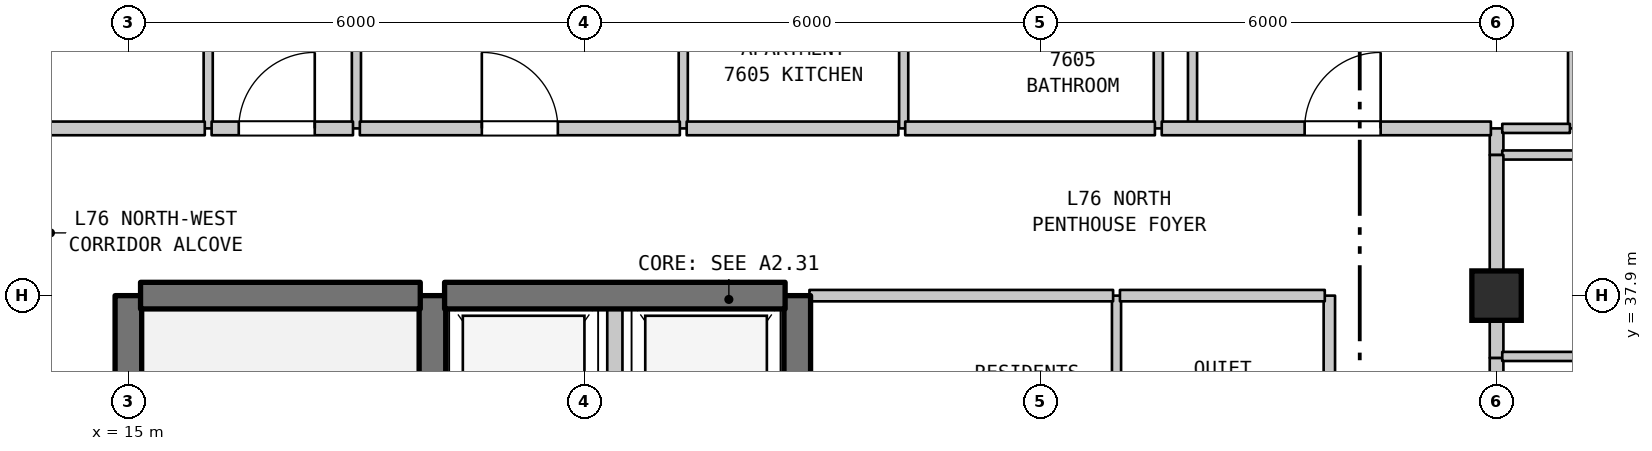
"""IFC4 building model, lengths in metres.
Left out: names, types, materials, properties, quantities, classifications, styles, units other than length and angle.
Written with IfcOpenShell. Run it as: python <this file> out.ifc"""

import sys

from ifc_helpers import new_model, si_unit, direction, frame, frame_2d, origin, origin_2d, place, context, subcontext, project, spatial, rectangle, extrude, element, fill, save


model = new_model("IFC4")
c1 = context("Model", 3, precision=1e-05, world=origin(), true_north=direction((0.0, 1.0)))
c2 = subcontext(c1, "Body", "Model", "MODEL_VIEW")
j1 = project(units=[si_unit("LENGTHUNIT", "METRE"), si_unit("PLANEANGLEUNIT", "RADIAN")], contexts=[c1])
p1 = place(None, origin())
s1 = spatial("IfcSite", under=j1, at=p1, CompositionType="ELEMENT")
p2 = place(p1, origin())
s2 = spatial("IfcBuilding", under=s1, at=p2, CompositionType="ELEMENT")
p3 = place(p2, frame((0.0, 0.0, 303.6)))
s3 = spatial("IfcBuildingStorey", under=s2, at=p3, CompositionType="ELEMENT", Elevation=303.6)
p4 = place(p3, frame((33.0, 37.9, 0.0), z_axis=(0.0, 0.0, 1.0), x_axis=(1.0, 0.0, 0.0)))
e1 = element("IfcColumn", 1, at=p4, inside=s3, PredefinedType="COLUMN", context=c2, shape_type="SweptSolid", body=[
    extrude(rectangle(XDim=0.65, YDim=0.65, at=origin_2d()), origin(), (0.0, 0.0, 1.0), 3.7),
])
p5 = place(p3, frame((15.0, 31.1, 0.0), z_axis=(0.0, 0.0, 1.0), x_axis=(0.0, 1.0, 0.0)))
e2 = element("IfcWall", 2, at=p5, inside=s3, PredefinedType="SHEAR", context=c2, shape_type="SweptSolid", body=[
    extrude(rectangle(XDim=6.8, YDim=0.35, at=frame_2d((3.4, 0.0))), origin(), (0.0, 0.0, 1.0), 3.39),
])
p6 = place(p3, frame((16.05, 40.1, 0.0), z_axis=(0.0, 0.0, 1.0), x_axis=(0.0, 1.0, 0.0)))
e3 = element("IfcWall", 3, at=p6, inside=s3, PredefinedType="PARTITIONING", context=c2, shape_type="SweptSolid", body=[
    extrude(rectangle(XDim=3.2, YDim=0.12, at=frame_2d((1.6, 0.0))), origin(), (0.0, 0.0, 1.0), 3.39),
])
p7 = place(p3, frame((18.0, 40.1, 0.0), z_axis=(0.0, 0.0, 1.0), x_axis=(0.0, 1.0, 0.0)))
e4 = element("IfcWall", 4, at=p7, inside=s3, PredefinedType="PARTITIONING", context=c2, shape_type="SweptSolid", body=[
    extrude(rectangle(XDim=13.79, YDim=0.12, at=frame_2d((6.895, 0.0))), origin(), (0.0, 0.0, 1.0), 3.39),
])
p8 = place(p3, frame((19.0, 35.0, 0.0), z_axis=(0.0, 0.0, 1.0), x_axis=(0.0, 1.0, 0.0)))
e5 = element("IfcWall", 5, at=p8, inside=s3, PredefinedType="SHEAR", context=c2, shape_type="SweptSolid", body=[
    extrude(rectangle(XDim=2.9, YDim=0.35, at=frame_2d((1.45, 0.0))), origin(), (0.0, 0.0, 1.0), 3.39),
])
p9 = place(p3, frame((21.4, 35.0, 0.0), z_axis=(0.0, 0.0, 1.0), x_axis=(0.0, 1.0, 0.0)))
e6 = element("IfcWall", 6, at=p9, inside=s3, PredefinedType="STANDARD", context=c2, shape_type="SweptSolid", body=[
    extrude(rectangle(XDim=2.9, YDim=0.2, at=frame_2d((1.45, 0.0))), origin(), (0.0, 0.0, 1.0), 3.39),
])
p10 = place(p3, frame((22.3, 40.1, 0.0), z_axis=(0.0, 0.0, 1.0), x_axis=(0.0, 1.0, 0.0)))
e7 = element("IfcWall", 7, at=p10, inside=s3, PredefinedType="PARTITIONING", context=c2, shape_type="SweptSolid", body=[
    extrude(rectangle(XDim=2.3, YDim=0.12, at=frame_2d((1.15, 0.0))), origin(), (0.0, 0.0, 1.0), 3.39),
])
p11 = place(p3, frame((23.8, 35.0, 0.0), z_axis=(0.0, 0.0, 1.0), x_axis=(0.0, 1.0, 0.0)))
e8 = element("IfcWall", 8, at=p11, inside=s3, PredefinedType="SHEAR", context=c2, shape_type="SweptSolid", body=[
    extrude(rectangle(XDim=2.9, YDim=0.35, at=frame_2d((1.45, 0.0))), origin(), (0.0, 0.0, 1.0), 3.39),
])
p12 = place(p3, frame((25.2, 40.1, 0.0), z_axis=(0.0, 0.0, 1.0), x_axis=(0.0, 1.0, 0.0)))
e9 = element("IfcWall", 9, at=p12, inside=s3, PredefinedType="PARTITIONING", context=c2, shape_type="SweptSolid", body=[
    extrude(rectangle(XDim=2.3, YDim=0.12, at=frame_2d((1.15, 0.0))), origin(), (0.0, 0.0, 1.0), 3.39),
])
p13 = place(p3, frame((28.0, 35.0, 0.0), z_axis=(0.0, 0.0, 1.0), x_axis=(0.0, 1.0, 0.0)))
e10 = element("IfcWall", 10, at=p13, inside=s3, PredefinedType="PARTITIONING", context=c2, shape_type="SweptSolid", body=[
    extrude(rectangle(XDim=2.9, YDim=0.12, at=frame_2d((1.45, 0.0))), origin(), (0.0, 0.0, 1.0), 3.39),
])
p14 = place(p3, frame((28.55, 40.1, 0.0), z_axis=(0.0, 0.0, 1.0), x_axis=(0.0, 1.0, 0.0)))
e11 = element("IfcWall", 11, at=p14, inside=s3, PredefinedType="PARTITIONING", context=c2, shape_type="SweptSolid", body=[
    extrude(rectangle(XDim=2.3, YDim=0.12, at=frame_2d((1.15, 0.0))), origin(), (0.0, 0.0, 1.0), 3.39),
])
p15 = place(p3, frame((29.0, 40.1, 0.0), z_axis=(0.0, 0.0, 1.0), x_axis=(0.0, 1.0, 0.0)))
e12 = element("IfcWall", 12, at=p15, inside=s3, PredefinedType="PARTITIONING", context=c2, shape_type="SweptSolid", body=[
    extrude(rectangle(XDim=2.05, YDim=0.12, at=frame_2d((1.025, 0.0))), origin(), (0.0, 0.0, 1.0), 3.39),
])
p16 = place(p3, frame((30.8, 35.0, 0.0), z_axis=(0.0, 0.0, 1.0), x_axis=(0.0, 1.0, 0.0)))
e13 = element("IfcWall", 13, at=p16, inside=s3, PredefinedType="STANDARD", context=c2, shape_type="SweptSolid", body=[
    extrude(rectangle(XDim=2.9, YDim=0.15, at=frame_2d((1.45, 0.0))), origin(), (0.0, 0.0, 1.0), 3.39),
])
p17 = place(p3, frame((33.0, 34.883, 0.0), z_axis=(0.0, 0.0, 1.0), x_axis=(0.0, 1.0, 0.0)))
e14 = element("IfcWall", 14, at=p17, inside=s3, PredefinedType="STANDARD", context=c2, shape_type="SweptSolid", body=[
    extrude(rectangle(XDim=2.198, YDim=0.18, at=frame_2d((1.099, 0.0))), origin(), (0.0, 0.0, 1.0), 2.89),
])
p18 = place(p3, frame((33.0, 37.081, 0.0), z_axis=(0.0, 0.0, 1.0), x_axis=(0.0, 1.0, 0.0)))
e15 = element("IfcWall", 15, at=p18, inside=s3, PredefinedType="STANDARD", context=c2, shape_type="SweptSolid", body=[
    extrude(rectangle(XDim=0.819, YDim=0.18, at=frame_2d((0.409, 0.0))), origin(), (0.0, 0.0, 1.0), 2.89),
])
p19 = place(p3, frame((33.0, 39.75, 0.0), z_axis=(0.0, 0.0, 1.0), x_axis=(0.0, 1.0, 0.0)))
e16 = element("IfcWall", 16, at=p19, inside=s3, PredefinedType="STANDARD", context=c2, shape_type="SweptSolid", body=[
    extrude(rectangle(XDim=0.35, YDim=0.18, at=frame_2d((0.175, 0.0))), origin(), (0.0, 0.0, 1.0), 3.39),
])
p20 = place(p3, frame((34.0, 40.1, 0.0), z_axis=(0.0, 0.0, 1.0), x_axis=(0.0, 1.0, 0.0)))
e17 = element("IfcWall", 17, at=p20, inside=s3, PredefinedType="PARTITIONING", context=c2, shape_type="SweptSolid", body=[
    extrude(rectangle(XDim=2.3, YDim=0.12, at=frame_2d((1.15, 0.0))), origin(), (0.0, 0.0, 1.0), 3.39),
])
p21 = place(p3, frame((33.075, 37.1, 0.0), z_axis=(0.0, 0.0, 1.0), x_axis=(1.0, 0.0, 0.0)))
e18 = element("IfcWall", 18, at=p21, inside=s3, PredefinedType="PARTITIONING", context=c2, shape_type="SweptSolid", body=[
    extrude(rectangle(XDim=4.46, YDim=0.12, at=frame_2d((2.23, 0.0))), origin(), (0.0, 0.0, 1.0), 3.39),
])
p22 = place(p3, frame((15.16, 37.9, 0.0), z_axis=(0.0, 0.0, 1.0), x_axis=(1.0, 0.0, 0.0)))
e19 = element("IfcWall", 19, at=p22, inside=s3, PredefinedType="SHEAR", context=c2, shape_type="SweptSolid", body=[
    extrude(rectangle(XDim=3.68, YDim=0.35, at=frame_2d((1.84, 0.0))), origin(), (0.0, 0.0, 1.0), 3.39),
])
p23 = place(p3, frame((19.16, 37.9, 0.0), z_axis=(0.0, 0.0, 1.0), x_axis=(1.0, 0.0, 0.0)))
e20 = element("IfcWall", 20, at=p23, inside=s3, PredefinedType="SHEAR", context=c2, shape_type="SweptSolid", body=[
    extrude(rectangle(XDim=4.48, YDim=0.35, at=frame_2d((2.24, 0.0))), origin(), (0.0, 0.0, 1.0), 3.39),
])
p24 = place(p3, frame((23.96, 37.9, 0.0), z_axis=(0.0, 0.0, 1.0), x_axis=(1.0, 0.0, 0.0)))
e21 = element("IfcWall", 21, at=p24, inside=s3, PredefinedType="STANDARD", context=c2, shape_type="SweptSolid", body=[
    extrude(rectangle(XDim=3.995, YDim=0.15, at=frame_2d((1.998, 0.0))), origin(), (0.0, 0.0, 1.0), 2.89),
])
p25 = place(p3, frame((28.045, 37.9, 0.0), z_axis=(0.0, 0.0, 1.0), x_axis=(1.0, 0.0, 0.0)))
e22 = element("IfcWall", 22, at=p25, inside=s3, PredefinedType="STANDARD", context=c2, shape_type="SweptSolid", body=[
    extrude(rectangle(XDim=2.695, YDim=0.15, at=frame_2d((1.348, 0.0))), origin(), (0.0, 0.0, 1.0), 2.89),
])
p26 = place(p3, frame((33.075, 39.75, 0.0), z_axis=(0.0, 0.0, 1.0), x_axis=(1.0, 0.0, 0.0)))
e23 = element("IfcWall", 23, at=p26, inside=s3, PredefinedType="PARTITIONING", context=c2, shape_type="SweptSolid", body=[
    extrude(rectangle(XDim=4.46, YDim=0.12, at=frame_2d((2.23, 0.0))), origin(), (0.0, 0.0, 1.0), 3.39),
])
p27 = place(p3, frame((13.745, 40.1, 0.0), z_axis=(0.0, 0.0, 1.0), x_axis=(1.0, 0.0, 0.0)))
e24 = element("IfcWall", 24, at=p27, inside=s3, PredefinedType="STANDARD", context=c2, shape_type="SweptSolid", body=[
    extrude(rectangle(XDim=2.26, YDim=0.18, at=frame_2d((1.13, 0.0))), origin(), (0.0, 0.0, 1.0), 3.39),
])
p28 = place(p3, frame((16.095, 40.1, 0.0), z_axis=(0.0, 0.0, 1.0), x_axis=(1.0, 0.0, 0.0)))
e25 = element("IfcWall", 25, at=p28, inside=s3, PredefinedType="STANDARD", context=c2, shape_type="SweptSolid", body=[
    extrude(rectangle(XDim=1.86, YDim=0.18, at=frame_2d((0.93, 0.0))), origin(), (0.0, 0.0, 1.0), 3.39),
])
p29 = place(p28, frame((0.357, 0.0, 0.0)))
e26 = element("IfcOpeningElement", 26, at=p29, cuts=e25, PredefinedType="OPENING", context=c2, shape_type="SweptSolid", body=[
    extrude(rectangle(XDim=1.0, YDim=2.15, at=frame_2d((0.5, 1.075))), frame((0.0, 0.1, 0.0), z_axis=(0.0, -1.0, 0.0), x_axis=(1.0, 0.0, 0.0)), (0.0, 0.0, 1.0), 0.2),
])
p30 = place(p3, frame((18.045, 40.1, 0.0), z_axis=(0.0, 0.0, 1.0), x_axis=(1.0, 0.0, 0.0)))
e27 = element("IfcWall", 27, at=p30, inside=s3, PredefinedType="STANDARD", context=c2, shape_type="SweptSolid", body=[
    extrude(rectangle(XDim=4.21, YDim=0.18, at=frame_2d((2.105, 0.0))), origin(), (0.0, 0.0, 1.0), 3.39),
])
p31 = place(p30, frame((1.605, 0.0, 0.0)))
e28 = element("IfcOpeningElement", 28, at=p31, cuts=e27, PredefinedType="OPENING", context=c2, shape_type="SweptSolid", body=[
    extrude(rectangle(XDim=1.0, YDim=2.15, at=frame_2d((0.5, 1.075))), frame((0.0, 0.1, 0.0), z_axis=(0.0, -1.0, 0.0), x_axis=(1.0, 0.0, 0.0)), (0.0, 0.0, 1.0), 0.2),
])
p32 = place(p3, frame((22.345, 40.1, 0.0), z_axis=(0.0, 0.0, 1.0), x_axis=(1.0, 0.0, 0.0)))
e29 = element("IfcWall", 29, at=p32, inside=s3, PredefinedType="STANDARD", context=c2, shape_type="SweptSolid", body=[
    extrude(rectangle(XDim=2.785, YDim=0.18, at=frame_2d((1.393, 0.0))), origin(), (0.0, 0.0, 1.0), 3.39),
])
p33 = place(p3, frame((25.22, 40.1, 0.0), z_axis=(0.0, 0.0, 1.0), x_axis=(1.0, 0.0, 0.0)))
e30 = element("IfcWall", 30, at=p33, inside=s3, PredefinedType="STANDARD", context=c2, shape_type="SweptSolid", body=[
    extrude(rectangle(XDim=3.285, YDim=0.18, at=frame_2d((1.643, 0.0))), origin(), (0.0, 0.0, 1.0), 3.39),
])
p34 = place(p3, frame((28.595, 40.1, 0.0), z_axis=(0.0, 0.0, 1.0), x_axis=(1.0, 0.0, 0.0)))
e31 = element("IfcWall", 31, at=p34, inside=s3, PredefinedType="STANDARD", context=c2, shape_type="SweptSolid", body=[
    extrude(rectangle(XDim=4.33, YDim=0.18, at=frame_2d((2.165, 0.0))), origin(), (0.0, 0.0, 1.0), 3.39),
])
p35 = place(p34, frame((1.88, 0.0, 0.0)))
e32 = element("IfcOpeningElement", 32, at=p35, cuts=e31, PredefinedType="OPENING", context=c2, shape_type="SweptSolid", body=[
    extrude(rectangle(XDim=1.0, YDim=2.15, at=frame_2d((0.5, 1.075))), frame((0.0, 0.1, 0.0), z_axis=(0.0, -1.0, 0.0), x_axis=(1.0, 0.0, 0.0)), (0.0, 0.0, 1.0), 0.2),
])
p36 = place(p3, frame((33.075, 40.1, 0.0), z_axis=(0.0, 0.0, 1.0), x_axis=(1.0, 0.0, 0.0)))
e33 = element("IfcWall", 33, at=p36, inside=s3, PredefinedType="PARTITIONING", context=c2, shape_type="SweptSolid", body=[
    extrude(rectangle(XDim=0.89, YDim=0.12, at=frame_2d((0.445, 0.0))), origin(), (0.0, 0.0, 1.0), 3.39),
])
p37 = place(p3, frame((33.0, 37.9, 0.0), z_axis=(0.0, 0.0, 1.0), x_axis=(0.0, 1.0, 0.0)))
e34 = element("IfcWall", 34, at=p37, inside=s3, PredefinedType="STANDARD", context=c2, shape_type="SweptSolid", body=[
    extrude(rectangle(XDim=1.85, YDim=0.18, at=frame_2d((0.925, 0.0))), origin(), (0.0, 0.0, 1.0), 2.79),
])
p38 = place(p29, origin())
e35 = element("IfcDoor", 35, at=p38, inside=s3, OperationType="SINGLE_SWING_RIGHT", PredefinedType="DOOR", context=c2, shape_type="SweptSolid", body=[
    extrude(rectangle(XDim=1.0, YDim=2.15, at=frame_2d((0.5, 1.075))), frame((0.0, 0.025, 0.0), z_axis=(0.0, -1.0, 0.0), x_axis=(1.0, 0.0, 0.0)), (0.0, 0.0, 1.0), 0.05),
])
fill(e26, e35)
p39 = place(p31, origin())
e36 = element("IfcDoor", 36, at=p39, inside=s3, OperationType="SINGLE_SWING_LEFT", PredefinedType="DOOR", context=c2, shape_type="SweptSolid", body=[
    extrude(rectangle(XDim=1.0, YDim=2.15, at=frame_2d((0.5, 1.075))), frame((0.0, 0.025, 0.0), z_axis=(0.0, -1.0, 0.0), x_axis=(1.0, 0.0, 0.0)), (0.0, 0.0, 1.0), 0.05),
])
fill(e28, e36)
p40 = place(p35, origin())
e37 = element("IfcDoor", 37, at=p40, inside=s3, OperationType="SINGLE_SWING_RIGHT", PredefinedType="DOOR", context=c2, shape_type="SweptSolid", body=[
    extrude(rectangle(XDim=1.0, YDim=2.15, at=frame_2d((0.5, 1.075))), frame((0.0, 0.025, 0.0), z_axis=(0.0, -1.0, 0.0), x_axis=(1.0, 0.0, 0.0)), (0.0, 0.0, 1.0), 0.05),
])
fill(e32, e37)
save(model, sys.argv[1])
